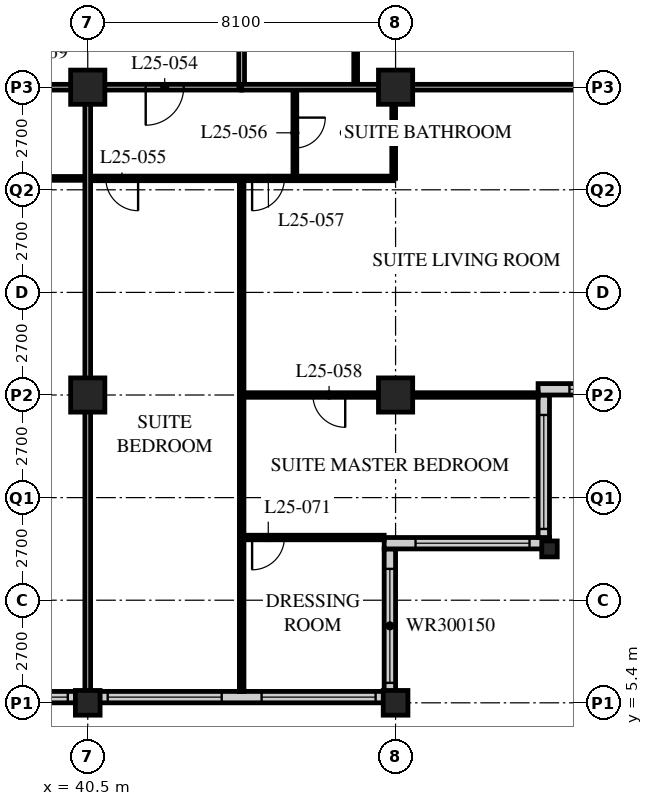
"""IFC4 building model, lengths in metres.
Left out: names, types, materials, properties, quantities, classifications, styles, units other than length and angle.
Written with IfcOpenShell. Run it as: python <this file> out.ifc"""

import sys

from ifc_helpers import new_model, si_unit, direction, frame, frame_2d, origin, origin_2d, place, context, subcontext, project, spatial, rectangle, hollow_rectangle, i_section, extrude, element, fill, save


model = new_model("IFC4")
c1 = context("Model", 3, precision=1e-05, world=origin(), true_north=direction((0.0, 1.0)))
c2 = subcontext(c1, "Body", "Model", "MODEL_VIEW")
j1 = project(units=[si_unit("LENGTHUNIT", "METRE"), si_unit("PLANEANGLEUNIT", "RADIAN")], contexts=[c1])
p1 = place(None, origin())
s1 = spatial("IfcSite", under=j1, at=p1, CompositionType="ELEMENT")
p2 = place(p1, origin())
s2 = spatial("IfcBuilding", under=s1, at=p2, CompositionType="ELEMENT")
p3 = place(p2, frame((0.0, 0.0, 103.4)))
s3 = spatial("IfcBuildingStorey", under=s2, at=p3, CompositionType="ELEMENT", Elevation=103.4)
p4 = place(p3, frame((40.5, 5.4, 0.0), z_axis=(0.0, 0.0, 1.0), x_axis=(1.0, 0.0, 0.0)))
e1 = element("IfcColumn", 1, at=p4, inside=s3, PredefinedType="COLUMN", context=c2, shape_type="SweptSolid", body=[
    extrude(hollow_rectangle(XDim=0.65, YDim=0.65, WallThickness=0.055, at=origin_2d()), origin(), (0.0, 0.0, 1.0), 3.4),
])
for number, where, z_axis, x_axis in (
    (2, (40.5, 13.5, 0.0), (0.0, 0.0, 1.0), (1.0, 0.0, 0.0)),
    (3, (40.5, 21.6, 0.0), (0.0, 0.0, 1.0), (1.0, 0.0, 0.0)),
):
    element("IfcColumn", number, at=place(p3, frame(where, z_axis=z_axis, x_axis=x_axis)), inside=s3, PredefinedType="COLUMN", context=c2, shape_type="SweptSolid", body=[
        extrude(hollow_rectangle(XDim=0.9, YDim=0.9, WallThickness=0.1, at=origin_2d()), origin(), (0.0, 0.0, 1.0), 3.4),
    ])
p5 = place(p3, frame((48.6, 5.4, 0.0), z_axis=(0.0, 0.0, 1.0), x_axis=(1.0, 0.0, 0.0)))
e4 = element("IfcColumn", 4, at=p5, inside=s3, PredefinedType="COLUMN", context=c2, shape_type="SweptSolid", body=[
    extrude(hollow_rectangle(XDim=0.65, YDim=0.65, WallThickness=0.055, at=origin_2d()), origin(), (0.0, 0.0, 1.0), 3.4),
])
for number, where, z_axis, x_axis in (
    (5, (48.6, 13.5, 0.0), (0.0, 0.0, 1.0), (1.0, 0.0, 0.0)),
    (6, (48.6, 21.6, 0.0), (0.0, 0.0, 1.0), (1.0, 0.0, 0.0)),
):
    element("IfcColumn", number, at=place(p3, frame(where, z_axis=z_axis, x_axis=x_axis)), inside=s3, PredefinedType="COLUMN", context=c2, shape_type="SweptSolid", body=[
        extrude(hollow_rectangle(XDim=0.9, YDim=0.9, WallThickness=0.1, at=origin_2d()), origin(), (0.0, 0.0, 1.0), 3.4),
    ])
p6 = place(p3, frame((52.65, 9.45, 0.0), z_axis=(0.0, 0.0, 1.0), x_axis=(1.0, 0.0, 0.0)))
e7 = element("IfcColumn", 7, at=p6, inside=s3, PredefinedType="COLUMN", context=c2, shape_type="SweptSolid", body=[
    extrude(i_section(OverallWidth=0.407, OverallDepth=0.419, WebThickness=0.031, FlangeThickness=0.049, FilletRadius=0.015, at=origin_2d()), origin(), (0.0, 0.0, 1.0), 3.4),
])
p7 = place(p3, frame((8.4, 5.55, 0.0), z_axis=(0.0, 0.0, 1.0), x_axis=(1.0, 0.0, 0.0)))
e8 = element("IfcWall", 8, at=p7, inside=s3, PredefinedType="SOLIDWALL", context=c2, shape_type="SweptSolid", body=[
    extrude(rectangle(XDim=40.2, YDim=0.3, at=frame_2d((20.1, 0.0))), origin(), (0.0, 0.0, 1.0), 3.19),
])
p8 = place(p7, frame((0.225, 0.0, 0.9)))
e9 = element("IfcOpeningElement", 9, at=p8, cuts=e8, PredefinedType="OPENING", context=c2, shape_type="SweptSolid", body=[
    extrude(rectangle(XDim=3.0, YDim=2.0, at=frame_2d((1.5, 1.0))), frame((0.0, 0.16, 0.0), z_axis=(0.0, -1.0, 0.0), x_axis=(1.0, 0.0, 0.0)), (0.0, 0.0, 1.0), 0.32),
])
p9 = place(p7, frame((4.275, 0.0, 0.9)))
e10 = element("IfcOpeningElement", 10, at=p9, cuts=e8, PredefinedType="OPENING", context=c2, shape_type="SweptSolid", body=[
    extrude(rectangle(XDim=3.0, YDim=2.0, at=frame_2d((1.5, 1.0))), frame((0.0, 0.16, 0.0), z_axis=(0.0, -1.0, 0.0), x_axis=(1.0, 0.0, 0.0)), (0.0, 0.0, 1.0), 0.32),
])
p10 = place(p7, frame((8.325, 0.0, 0.9)))
e11 = element("IfcOpeningElement", 11, at=p10, cuts=e8, PredefinedType="OPENING", context=c2, shape_type="SweptSolid", body=[
    extrude(rectangle(XDim=3.0, YDim=2.0, at=frame_2d((1.5, 1.0))), frame((0.0, 0.16, 0.0), z_axis=(0.0, -1.0, 0.0), x_axis=(1.0, 0.0, 0.0)), (0.0, 0.0, 1.0), 0.32),
])
p11 = place(p7, frame((12.375, 0.0, 0.9)))
e12 = element("IfcOpeningElement", 12, at=p11, cuts=e8, PredefinedType="OPENING", context=c2, shape_type="SweptSolid", body=[
    extrude(rectangle(XDim=3.0, YDim=2.0, at=frame_2d((1.5, 1.0))), frame((0.0, 0.16, 0.0), z_axis=(0.0, -1.0, 0.0), x_axis=(1.0, 0.0, 0.0)), (0.0, 0.0, 1.0), 0.32),
])
p12 = place(p7, frame((16.425, 0.0, 0.9)))
e13 = element("IfcOpeningElement", 13, at=p12, cuts=e8, PredefinedType="OPENING", context=c2, shape_type="SweptSolid", body=[
    extrude(rectangle(XDim=3.0, YDim=2.0, at=frame_2d((1.5, 1.0))), frame((0.0, 0.16, 0.0), z_axis=(0.0, -1.0, 0.0), x_axis=(1.0, 0.0, 0.0)), (0.0, 0.0, 1.0), 0.32),
])
p13 = place(p7, frame((20.475, 0.0, 0.9)))
e14 = element("IfcOpeningElement", 14, at=p13, cuts=e8, PredefinedType="OPENING", context=c2, shape_type="SweptSolid", body=[
    extrude(rectangle(XDim=3.0, YDim=2.0, at=frame_2d((1.5, 1.0))), frame((0.0, 0.16, 0.0), z_axis=(0.0, -1.0, 0.0), x_axis=(1.0, 0.0, 0.0)), (0.0, 0.0, 1.0), 0.32),
])
p14 = place(p7, frame((24.525, 0.0, 0.9)))
e15 = element("IfcOpeningElement", 15, at=p14, cuts=e8, PredefinedType="OPENING", context=c2, shape_type="SweptSolid", body=[
    extrude(rectangle(XDim=3.0, YDim=2.0, at=frame_2d((1.5, 1.0))), frame((0.0, 0.16, 0.0), z_axis=(0.0, -1.0, 0.0), x_axis=(1.0, 0.0, 0.0)), (0.0, 0.0, 1.0), 0.32),
])
p15 = place(p7, frame((28.575, 0.0, 0.9)))
e16 = element("IfcOpeningElement", 16, at=p15, cuts=e8, PredefinedType="OPENING", context=c2, shape_type="SweptSolid", body=[
    extrude(rectangle(XDim=3.0, YDim=2.0, at=frame_2d((1.5, 1.0))), frame((0.0, 0.16, 0.0), z_axis=(0.0, -1.0, 0.0), x_axis=(1.0, 0.0, 0.0)), (0.0, 0.0, 1.0), 0.32),
])
p16 = place(p7, frame((32.625, 0.0, 0.9)))
e17 = element("IfcOpeningElement", 17, at=p16, cuts=e8, PredefinedType="OPENING", context=c2, shape_type="SweptSolid", body=[
    extrude(rectangle(XDim=3.0, YDim=2.0, at=frame_2d((1.5, 1.0))), frame((0.0, 0.16, 0.0), z_axis=(0.0, -1.0, 0.0), x_axis=(1.0, 0.0, 0.0)), (0.0, 0.0, 1.0), 0.32),
])
p17 = place(p7, frame((36.675, 0.0, 0.9)))
e18 = element("IfcOpeningElement", 18, at=p17, cuts=e8, PredefinedType="OPENING", context=c2, shape_type="SweptSolid", body=[
    extrude(rectangle(XDim=3.0, YDim=2.0, at=frame_2d((1.5, 1.0))), frame((0.0, 0.16, 0.0), z_axis=(0.0, -1.0, 0.0), x_axis=(1.0, 0.0, 0.0)), (0.0, 0.0, 1.0), 0.32),
])
p18 = place(p3, frame((48.45, 5.7, 0.0), z_axis=(0.0, 0.0, 1.0), x_axis=(0.0, 1.0, 0.0)))
e19 = element("IfcWall", 19, at=p18, inside=s3, PredefinedType="SOLIDWALL", context=c2, shape_type="SweptSolid", body=[
    extrude(rectangle(XDim=3.75, YDim=0.3, at=frame_2d((1.875, 0.0))), origin(), (0.0, 0.0, 1.0), 3.19),
])
p19 = place(p18, frame((0.225, 0.0, 0.9)))
e20 = element("IfcOpeningElement", 20, at=p19, cuts=e19, PredefinedType="OPENING", context=c2, shape_type="SweptSolid", body=[
    extrude(rectangle(XDim=3.0, YDim=1.5, at=frame_2d((1.5, 0.75))), frame((0.0, 0.16, 0.0), z_axis=(0.0, -1.0, 0.0), x_axis=(1.0, 0.0, 0.0)), (0.0, 0.0, 1.0), 0.32),
])
p20 = place(p3, frame((48.3, 9.6, 0.0), z_axis=(0.0, 0.0, 1.0), x_axis=(1.0, 0.0, 0.0)))
e21 = element("IfcWall", 21, at=p20, inside=s3, PredefinedType="SOLIDWALL", context=c2, shape_type="SweptSolid", body=[
    extrude(rectangle(XDim=4.35, YDim=0.3, at=frame_2d((2.175, 0.0))), origin(), (0.0, 0.0, 1.0), 3.19),
])
p21 = place(p20, frame((0.825, 0.0, 0.9)))
e22 = element("IfcOpeningElement", 22, at=p21, cuts=e21, PredefinedType="OPENING", context=c2, shape_type="SweptSolid", body=[
    extrude(rectangle(XDim=3.0, YDim=1.5, at=frame_2d((1.5, 0.75))), frame((0.0, 0.16, 0.0), z_axis=(0.0, -1.0, 0.0), x_axis=(1.0, 0.0, 0.0)), (0.0, 0.0, 1.0), 0.32),
])
p22 = place(p3, frame((52.5, 9.75, 0.0), z_axis=(0.0, 0.0, 1.0), x_axis=(0.0, 1.0, 0.0)))
e23 = element("IfcWall", 23, at=p22, inside=s3, PredefinedType="SOLIDWALL", context=c2, shape_type="SweptSolid", body=[
    extrude(rectangle(XDim=3.75, YDim=0.3, at=frame_2d((1.875, 0.0))), origin(), (0.0, 0.0, 1.0), 3.19),
])
p23 = place(p22, frame((0.225, 0.0, 0.9)))
e24 = element("IfcOpeningElement", 24, at=p23, cuts=e23, PredefinedType="OPENING", context=c2, shape_type="SweptSolid", body=[
    extrude(rectangle(XDim=3.0, YDim=1.5, at=frame_2d((1.5, 0.75))), frame((0.0, 0.16, 0.0), z_axis=(0.0, -1.0, 0.0), x_axis=(1.0, 0.0, 0.0)), (0.0, 0.0, 1.0), 0.32),
])
p24 = place(p3, frame((52.35, 13.65, 0.0), z_axis=(0.0, 0.0, 1.0), x_axis=(1.0, 0.0, 0.0)))
e25 = element("IfcWall", 25, at=p24, inside=s3, PredefinedType="SOLIDWALL", context=c2, shape_type="SweptSolid", body=[
    extrude(rectangle(XDim=4.35, YDim=0.3, at=frame_2d((2.175, 0.0))), origin(), (0.0, 0.0, 1.0), 3.19),
])
p25 = place(p24, frame((0.825, 0.0, 0.9)))
e26 = element("IfcOpeningElement", 26, at=p25, cuts=e25, PredefinedType="OPENING", context=c2, shape_type="SweptSolid", body=[
    extrude(rectangle(XDim=3.0, YDim=1.5, at=frame_2d((1.5, 0.75))), frame((0.0, 0.16, 0.0), z_axis=(0.0, -1.0, 0.0), x_axis=(1.0, 0.0, 0.0)), (0.0, 0.0, 1.0), 0.32),
])
p26 = place(p3, frame((12.15, 21.6, 0.0), z_axis=(0.0, 0.0, 1.0), x_axis=(1.0, 0.0, 0.0)))
e27 = element("IfcWall", 27, at=p26, inside=s3, PredefinedType="PARTITIONING", context=c2, shape_type="SweptSolid", body=[
    extrude(rectangle(XDim=32.4, YDim=0.15, at=frame_2d((16.2, 0.0))), origin(), (0.0, 0.0, 1.0), 2.578),
])
p27 = place(p26, frame((5.95, 0.0, 0.0)))
e28 = element("IfcOpeningElement", 28, at=p27, cuts=e27, PredefinedType="OPENING", context=c2, shape_type="SweptSolid", body=[
    extrude(rectangle(XDim=1.0, YDim=2.1, at=frame_2d((0.5, 1.05))), frame((0.0, 0.085, 0.0), z_axis=(0.0, -1.0, 0.0), x_axis=(1.0, 0.0, 0.0)), (0.0, 0.0, 1.0), 0.17),
])
p28 = place(p26, frame((14.05, 0.0, 0.0)))
e29 = element("IfcOpeningElement", 29, at=p28, cuts=e27, PredefinedType="OPENING", context=c2, shape_type="SweptSolid", body=[
    extrude(rectangle(XDim=1.0, YDim=2.1, at=frame_2d((0.5, 1.05))), frame((0.0, 0.085, 0.0), z_axis=(0.0, -1.0, 0.0), x_axis=(1.0, 0.0, 0.0)), (0.0, 0.0, 1.0), 0.17),
])
p29 = place(p26, frame((22.15, 0.0, 0.0)))
e30 = element("IfcOpeningElement", 30, at=p29, cuts=e27, PredefinedType="OPENING", context=c2, shape_type="SweptSolid", body=[
    extrude(rectangle(XDim=1.0, YDim=2.1, at=frame_2d((0.5, 1.05))), frame((0.0, 0.085, 0.0), z_axis=(0.0, -1.0, 0.0), x_axis=(1.0, 0.0, 0.0)), (0.0, 0.0, 1.0), 0.17),
])
p30 = place(p26, frame((1.525, 0.0, 0.0)))
e31 = element("IfcOpeningElement", 31, at=p30, cuts=e27, PredefinedType="OPENING", context=c2, shape_type="SweptSolid", body=[
    extrude(rectangle(XDim=1.0, YDim=2.1, at=frame_2d((0.5, 1.05))), frame((0.0, 0.085, 0.0), z_axis=(0.0, -1.0, 0.0), x_axis=(1.0, 0.0, 0.0)), (0.0, 0.0, 1.0), 0.17),
])
p31 = place(p26, frame((29.875, 0.0, 0.0)))
e32 = element("IfcOpeningElement", 32, at=p31, cuts=e27, PredefinedType="OPENING", context=c2, shape_type="SweptSolid", body=[
    extrude(rectangle(XDim=1.0, YDim=2.1, at=frame_2d((0.5, 1.05))), frame((0.0, 0.085, 0.0), z_axis=(0.0, -1.0, 0.0), x_axis=(1.0, 0.0, 0.0)), (0.0, 0.0, 1.0), 0.17),
])
p32 = place(p3, frame((44.55, 21.6, 0.0), z_axis=(0.0, 0.0, 1.0), x_axis=(0.0, 1.0, 0.0)))
e33 = element("IfcWall", 33, at=p32, inside=s3, PredefinedType="PARTITIONING", context=c2, shape_type="SweptSolid", body=[
    extrude(rectangle(XDim=24.3, YDim=0.15, at=frame_2d((12.15, 0.0))), origin(), (0.0, 0.0, 1.0), 3.19),
])
p33 = place(p32, frame((2.75, 0.0, 0.0)))
e34 = element("IfcOpeningElement", 34, at=p33, cuts=e33, PredefinedType="OPENING", context=c2, shape_type="SweptSolid", body=[
    extrude(rectangle(XDim=1.0, YDim=2.1, at=frame_2d((0.5, 1.05))), frame((0.0, 0.085, 0.0), z_axis=(0.0, -1.0, 0.0), x_axis=(1.0, 0.0, 0.0)), (0.0, 0.0, 1.0), 0.17),
])
p34 = place(p32, frame((6.5, 0.0, 0.0)))
e35 = element("IfcOpeningElement", 35, at=p34, cuts=e33, PredefinedType="OPENING", context=c2, shape_type="SweptSolid", body=[
    extrude(rectangle(XDim=1.0, YDim=2.1, at=frame_2d((0.5, 1.05))), frame((0.0, 0.085, 0.0), z_axis=(0.0, -1.0, 0.0), x_axis=(1.0, 0.0, 0.0)), (0.0, 0.0, 1.0), 0.17),
])
p35 = place(p32, frame((13.55, 0.0, 0.0)))
e36 = element("IfcOpeningElement", 36, at=p35, cuts=e33, PredefinedType="OPENING", context=c2, shape_type="SweptSolid", body=[
    extrude(rectangle(XDim=1.0, YDim=2.1, at=frame_2d((0.5, 1.05))), frame((0.0, 0.085, 0.0), z_axis=(0.0, -1.0, 0.0), x_axis=(1.0, 0.0, 0.0)), (0.0, 0.0, 1.0), 0.17),
])
p36 = place(p32, frame((21.65, 0.0, 0.0)))
e37 = element("IfcOpeningElement", 37, at=p36, cuts=e33, PredefinedType="OPENING", context=c2, shape_type="SweptSolid", body=[
    extrude(rectangle(XDim=1.0, YDim=2.1, at=frame_2d((0.5, 1.05))), frame((0.0, 0.085, 0.0), z_axis=(0.0, -1.0, 0.0), x_axis=(1.0, 0.0, 0.0)), (0.0, 0.0, 1.0), 0.17),
])
p37 = place(p3, frame((37.9, 19.2, 0.0), z_axis=(0.0, 0.0, 1.0), x_axis=(1.0, 0.0, 0.0)))
e38 = element("IfcWall", 38, at=p37, inside=s3, PredefinedType="PARTITIONING", context=c2, shape_type="SweptSolid", body=[
    extrude(rectangle(XDim=2.6, YDim=0.1, at=frame_2d((1.3, 0.0))), origin(), (0.0, 0.0, 1.0), 3.19),
])
p38 = place(p3, frame((47.55, 21.6, 0.0), z_axis=(0.0, 0.0, 1.0), x_axis=(0.0, 1.0, 0.0)))
e39 = element("IfcWall", 39, at=p38, inside=s3, PredefinedType="PARTITIONING", context=c2, shape_type="SweptSolid", body=[
    extrude(rectangle(XDim=2.6, YDim=0.1, at=frame_2d((1.3, 0.0))), origin(), (0.0, 0.0, 1.0), 3.19),
])
p39 = place(p3, frame((40.5, 19.2, 0.0), z_axis=(0.0, 0.0, 1.0), x_axis=(1.0, 0.0, 0.0)))
e40 = element("IfcWall", 40, at=p39, inside=s3, PredefinedType="PARTITIONING", context=c2, shape_type="SweptSolid", body=[
    extrude(rectangle(XDim=8.05, YDim=0.12, at=frame_2d((4.025, 0.0))), origin(), (0.0, 0.0, 1.0), 3.19),
])
p40 = place(p39, frame((0.475, 0.0, 0.0)))
e41 = element("IfcOpeningElement", 41, at=p40, cuts=e40, PredefinedType="OPENING", context=c2, shape_type="SweptSolid", body=[
    extrude(rectangle(XDim=0.85, YDim=2.1, at=frame_2d((0.425, 1.05))), frame((0.0, 0.07, 0.0), z_axis=(0.0, -1.0, 0.0), x_axis=(1.0, 0.0, 0.0)), (0.0, 0.0, 1.0), 0.14),
])
p41 = place(p39, frame((4.325, 0.0, 0.0)))
e42 = element("IfcOpeningElement", 42, at=p41, cuts=e40, PredefinedType="OPENING", context=c2, shape_type="SweptSolid", body=[
    extrude(rectangle(XDim=0.85, YDim=2.1, at=frame_2d((0.425, 1.05))), frame((0.0, 0.07, 0.0), z_axis=(0.0, -1.0, 0.0), x_axis=(1.0, 0.0, 0.0)), (0.0, 0.0, 1.0), 0.14),
])
p42 = place(p3, frame((45.95, 21.6, 0.0), z_axis=(0.0, 0.0, 1.0), x_axis=(0.0, -1.0, 0.0)))
e43 = element("IfcWall", 43, at=p42, inside=s3, PredefinedType="PARTITIONING", context=c2, shape_type="SweptSolid", body=[
    extrude(rectangle(XDim=2.4, YDim=0.1, at=frame_2d((1.2, 0.0))), origin(), (0.0, 0.0, 1.0), 3.19),
])
p43 = place(p42, frame((0.8, 0.0, 0.0)))
e44 = element("IfcOpeningElement", 44, at=p43, cuts=e43, PredefinedType="OPENING", context=c2, shape_type="SweptSolid", body=[
    extrude(rectangle(XDim=0.8, YDim=2.1, at=frame_2d((0.4, 1.05))), frame((0.0, 0.06, 0.0), z_axis=(0.0, -1.0, 0.0), x_axis=(1.0, 0.0, 0.0)), (0.0, 0.0, 1.0), 0.12),
])
p44 = place(p3, frame((48.55, 21.6, 0.0), z_axis=(0.0, 0.0, 1.0), x_axis=(0.0, -1.0, 0.0)))
e45 = element("IfcWall", 45, at=p44, inside=s3, PredefinedType="PARTITIONING", context=c2, shape_type="SweptSolid", body=[
    extrude(rectangle(XDim=2.4, YDim=0.1, at=frame_2d((1.2, 0.0))), origin(), (0.0, 0.0, 1.0), 2.578),
])
p45 = place(p3, frame((44.55, 19.2, 0.0), z_axis=(0.0, 0.0, 1.0), x_axis=(0.0, -1.0, 0.0)))
e46 = element("IfcWall", 46, at=p45, inside=s3, PredefinedType="PARTITIONING", context=c2, shape_type="SweptSolid", body=[
    extrude(rectangle(XDim=13.5, YDim=0.12, at=frame_2d((6.75, 0.0))), origin(), (0.0, 0.0, 1.0), 3.19),
])
p46 = place(p3, frame((44.55, 13.5, 0.0), z_axis=(0.0, 0.0, 1.0), x_axis=(1.0, 0.0, 0.0)))
e47 = element("IfcWall", 47, at=p46, inside=s3, PredefinedType="PARTITIONING", context=c2, shape_type="SweptSolid", body=[
    extrude(rectangle(XDim=7.8, YDim=0.12, at=frame_2d((3.9, 0.0))), origin(), (0.0, 0.0, 1.0), 2.578),
])
p47 = place(p46, frame((1.875, 0.0, 0.0)))
e48 = element("IfcOpeningElement", 48, at=p47, cuts=e47, PredefinedType="OPENING", context=c2, shape_type="SweptSolid", body=[
    extrude(rectangle(XDim=0.85, YDim=2.1, at=frame_2d((0.425, 1.05))), frame((0.0, 0.07, 0.0), z_axis=(0.0, -1.0, 0.0), x_axis=(1.0, 0.0, 0.0)), (0.0, 0.0, 1.0), 0.14),
])
p48 = place(p3, frame((44.55, 21.6, 0.0), z_axis=(0.0, 0.0, 1.0), x_axis=(1.0, 0.0, 0.0)))
e49 = element("IfcWall", 49, at=p48, inside=s3, PredefinedType="PARTITIONING", context=c2, shape_type="SweptSolid", body=[
    extrude(rectangle(XDim=11.85, YDim=0.15, at=frame_2d((5.925, 0.0))), origin(), (0.0, 0.0, 1.0), 2.578),
])
p49 = place(p3, frame((40.5, 21.6, 0.0), z_axis=(0.0, 0.0, 1.0), x_axis=(0.0, -1.0, 0.0)))
e50 = element("IfcWall", 50, at=p49, inside=s3, PredefinedType="PARTITIONING", context=c2, shape_type="SweptSolid", body=[
    extrude(rectangle(XDim=15.9, YDim=0.15, at=frame_2d((7.95, 0.0))), origin(), (0.0, 0.0, 1.0), 2.578),
])
p50 = place(p3, frame((44.55, 9.75, 0.0), z_axis=(0.0, 0.0, 1.0), x_axis=(1.0, 0.0, 0.0)))
e51 = element("IfcWall", 51, at=p50, inside=s3, PredefinedType="PARTITIONING", context=c2, shape_type="SweptSolid", body=[
    extrude(rectangle(XDim=3.75, YDim=0.12, at=frame_2d((1.875, 0.0))), origin(), (0.0, 0.0, 1.0), 3.19),
])
p51 = place(p50, frame((0.275, 0.0, 0.0)))
e52 = element("IfcOpeningElement", 52, at=p51, cuts=e51, PredefinedType="OPENING", context=c2, shape_type="SweptSolid", body=[
    extrude(rectangle(XDim=0.85, YDim=2.1, at=frame_2d((0.425, 1.05))), frame((0.0, 0.07, 0.0), z_axis=(0.0, -1.0, 0.0), x_axis=(1.0, 0.0, 0.0)), (0.0, 0.0, 1.0), 0.14),
])
p52 = place(p15, origin())
e53 = element("IfcWindow", 53, at=p52, inside=s3, PartitioningType="SINGLE_PANEL", PredefinedType="WINDOW", context=c2, shape_type="SweptSolid", body=[
    extrude(rectangle(XDim=3.0, YDim=2.0, at=frame_2d((1.5, 1.0))), frame((0.0, 0.03, 0.0), z_axis=(0.0, -1.0, 0.0), x_axis=(1.0, 0.0, 0.0)), (0.0, 0.0, 1.0), 0.06),
])
fill(e16, e53)
p53 = place(p16, origin())
e54 = element("IfcWindow", 54, at=p53, inside=s3, PartitioningType="SINGLE_PANEL", PredefinedType="WINDOW", context=c2, shape_type="SweptSolid", body=[
    extrude(rectangle(XDim=3.0, YDim=2.0, at=frame_2d((1.5, 1.0))), frame((0.0, 0.03, 0.0), z_axis=(0.0, -1.0, 0.0), x_axis=(1.0, 0.0, 0.0)), (0.0, 0.0, 1.0), 0.06),
])
fill(e17, e54)
p54 = place(p17, origin())
e55 = element("IfcWindow", 55, at=p54, inside=s3, PartitioningType="SINGLE_PANEL", PredefinedType="WINDOW", context=c2, shape_type="SweptSolid", body=[
    extrude(rectangle(XDim=3.0, YDim=2.0, at=frame_2d((1.5, 1.0))), frame((0.0, 0.03, 0.0), z_axis=(0.0, -1.0, 0.0), x_axis=(1.0, 0.0, 0.0)), (0.0, 0.0, 1.0), 0.06),
])
fill(e18, e55)
p55 = place(p19, origin())
e56 = element("IfcWindow", 56, at=p55, inside=s3, PartitioningType="SINGLE_PANEL", PredefinedType="WINDOW", context=c2, shape_type="SweptSolid", body=[
    extrude(rectangle(XDim=3.0, YDim=1.5, at=frame_2d((1.5, 0.75))), frame((0.0, 0.03, 0.0), z_axis=(0.0, -1.0, 0.0), x_axis=(1.0, 0.0, 0.0)), (0.0, 0.0, 1.0), 0.06),
])
fill(e20, e56)
p56 = place(p21, origin())
e57 = element("IfcWindow", 57, at=p56, inside=s3, PartitioningType="SINGLE_PANEL", PredefinedType="WINDOW", context=c2, shape_type="SweptSolid", body=[
    extrude(rectangle(XDim=3.0, YDim=1.5, at=frame_2d((1.5, 0.75))), frame((0.0, 0.03, 0.0), z_axis=(0.0, -1.0, 0.0), x_axis=(1.0, 0.0, 0.0)), (0.0, 0.0, 1.0), 0.06),
])
fill(e22, e57)
p57 = place(p23, origin())
e58 = element("IfcWindow", 58, at=p57, inside=s3, PartitioningType="SINGLE_PANEL", PredefinedType="WINDOW", context=c2, shape_type="SweptSolid", body=[
    extrude(rectangle(XDim=3.0, YDim=1.5, at=frame_2d((1.5, 0.75))), frame((0.0, 0.03, 0.0), z_axis=(0.0, -1.0, 0.0), x_axis=(1.0, 0.0, 0.0)), (0.0, 0.0, 1.0), 0.06),
])
fill(e24, e58)
p58 = place(p25, origin())
e59 = element("IfcWindow", 59, at=p58, inside=s3, PartitioningType="SINGLE_PANEL", PredefinedType="WINDOW", context=c2, shape_type="SweptSolid", body=[
    extrude(rectangle(XDim=3.0, YDim=1.5, at=frame_2d((1.5, 0.75))), frame((0.0, 0.03, 0.0), z_axis=(0.0, -1.0, 0.0), x_axis=(1.0, 0.0, 0.0)), (0.0, 0.0, 1.0), 0.06),
])
fill(e26, e59)
p59 = place(p31, origin())
e60 = element("IfcDoor", 60, at=p59, inside=s3, OperationType="SINGLE_SWING_RIGHT", PredefinedType="DOOR", context=c2, shape_type="SweptSolid", body=[
    extrude(rectangle(XDim=1.0, YDim=2.1, at=frame_2d((0.5, 1.05))), frame((0.0, 0.025, 0.0), z_axis=(0.0, -1.0, 0.0), x_axis=(1.0, 0.0, 0.0)), (0.0, 0.0, 1.0), 0.05),
])
fill(e32, e60)
p60 = place(p40, origin())
e61 = element("IfcDoor", 61, at=p60, inside=s3, OperationType="SINGLE_SWING_LEFT", PredefinedType="DOOR", context=c2, shape_type="SweptSolid", body=[
    extrude(rectangle(XDim=0.85, YDim=2.1, at=frame_2d((0.425, 1.05))), frame((0.0, 0.025, 0.0), z_axis=(0.0, -1.0, 0.0), x_axis=(1.0, 0.0, 0.0)), (0.0, 0.0, 1.0), 0.05),
])
fill(e41, e61)
p61 = place(p43, origin())
e62 = element("IfcDoor", 62, at=p61, inside=s3, OperationType="SINGLE_SWING_LEFT", PredefinedType="DOOR", context=c2, shape_type="SweptSolid", body=[
    extrude(rectangle(XDim=0.8, YDim=2.1, at=frame_2d((0.4, 1.05))), frame((0.0, 0.025, 0.0), z_axis=(0.0, -1.0, 0.0), x_axis=(1.0, 0.0, 0.0)), (0.0, 0.0, 1.0), 0.05),
])
fill(e44, e62)
p62 = place(p41, origin())
e63 = element("IfcDoor", 63, at=p62, inside=s3, OperationType="SINGLE_SWING_RIGHT", PredefinedType="DOOR", context=c2, shape_type="SweptSolid", body=[
    extrude(rectangle(XDim=0.85, YDim=2.1, at=frame_2d((0.425, 1.05))), frame((0.0, 0.025, 0.0), z_axis=(0.0, -1.0, 0.0), x_axis=(1.0, 0.0, 0.0)), (0.0, 0.0, 1.0), 0.05),
])
fill(e42, e63)
p63 = place(p47, origin())
e64 = element("IfcDoor", 64, at=p63, inside=s3, OperationType="SINGLE_SWING_LEFT", PredefinedType="DOOR", context=c2, shape_type="SweptSolid", body=[
    extrude(rectangle(XDim=0.85, YDim=2.1, at=frame_2d((0.425, 1.05))), frame((0.0, 0.025, 0.0), z_axis=(0.0, -1.0, 0.0), x_axis=(1.0, 0.0, 0.0)), (0.0, 0.0, 1.0), 0.05),
])
fill(e48, e64)
p64 = place(p51, origin())
e65 = element("IfcDoor", 65, at=p64, inside=s3, OperationType="SINGLE_SWING_RIGHT", PredefinedType="DOOR", context=c2, shape_type="SweptSolid", body=[
    extrude(rectangle(XDim=0.85, YDim=2.1, at=frame_2d((0.425, 1.05))), frame((0.0, 0.025, 0.0), z_axis=(0.0, -1.0, 0.0), x_axis=(1.0, 0.0, 0.0)), (0.0, 0.0, 1.0), 0.05),
])
fill(e52, e65)
save(model, sys.argv[1])
